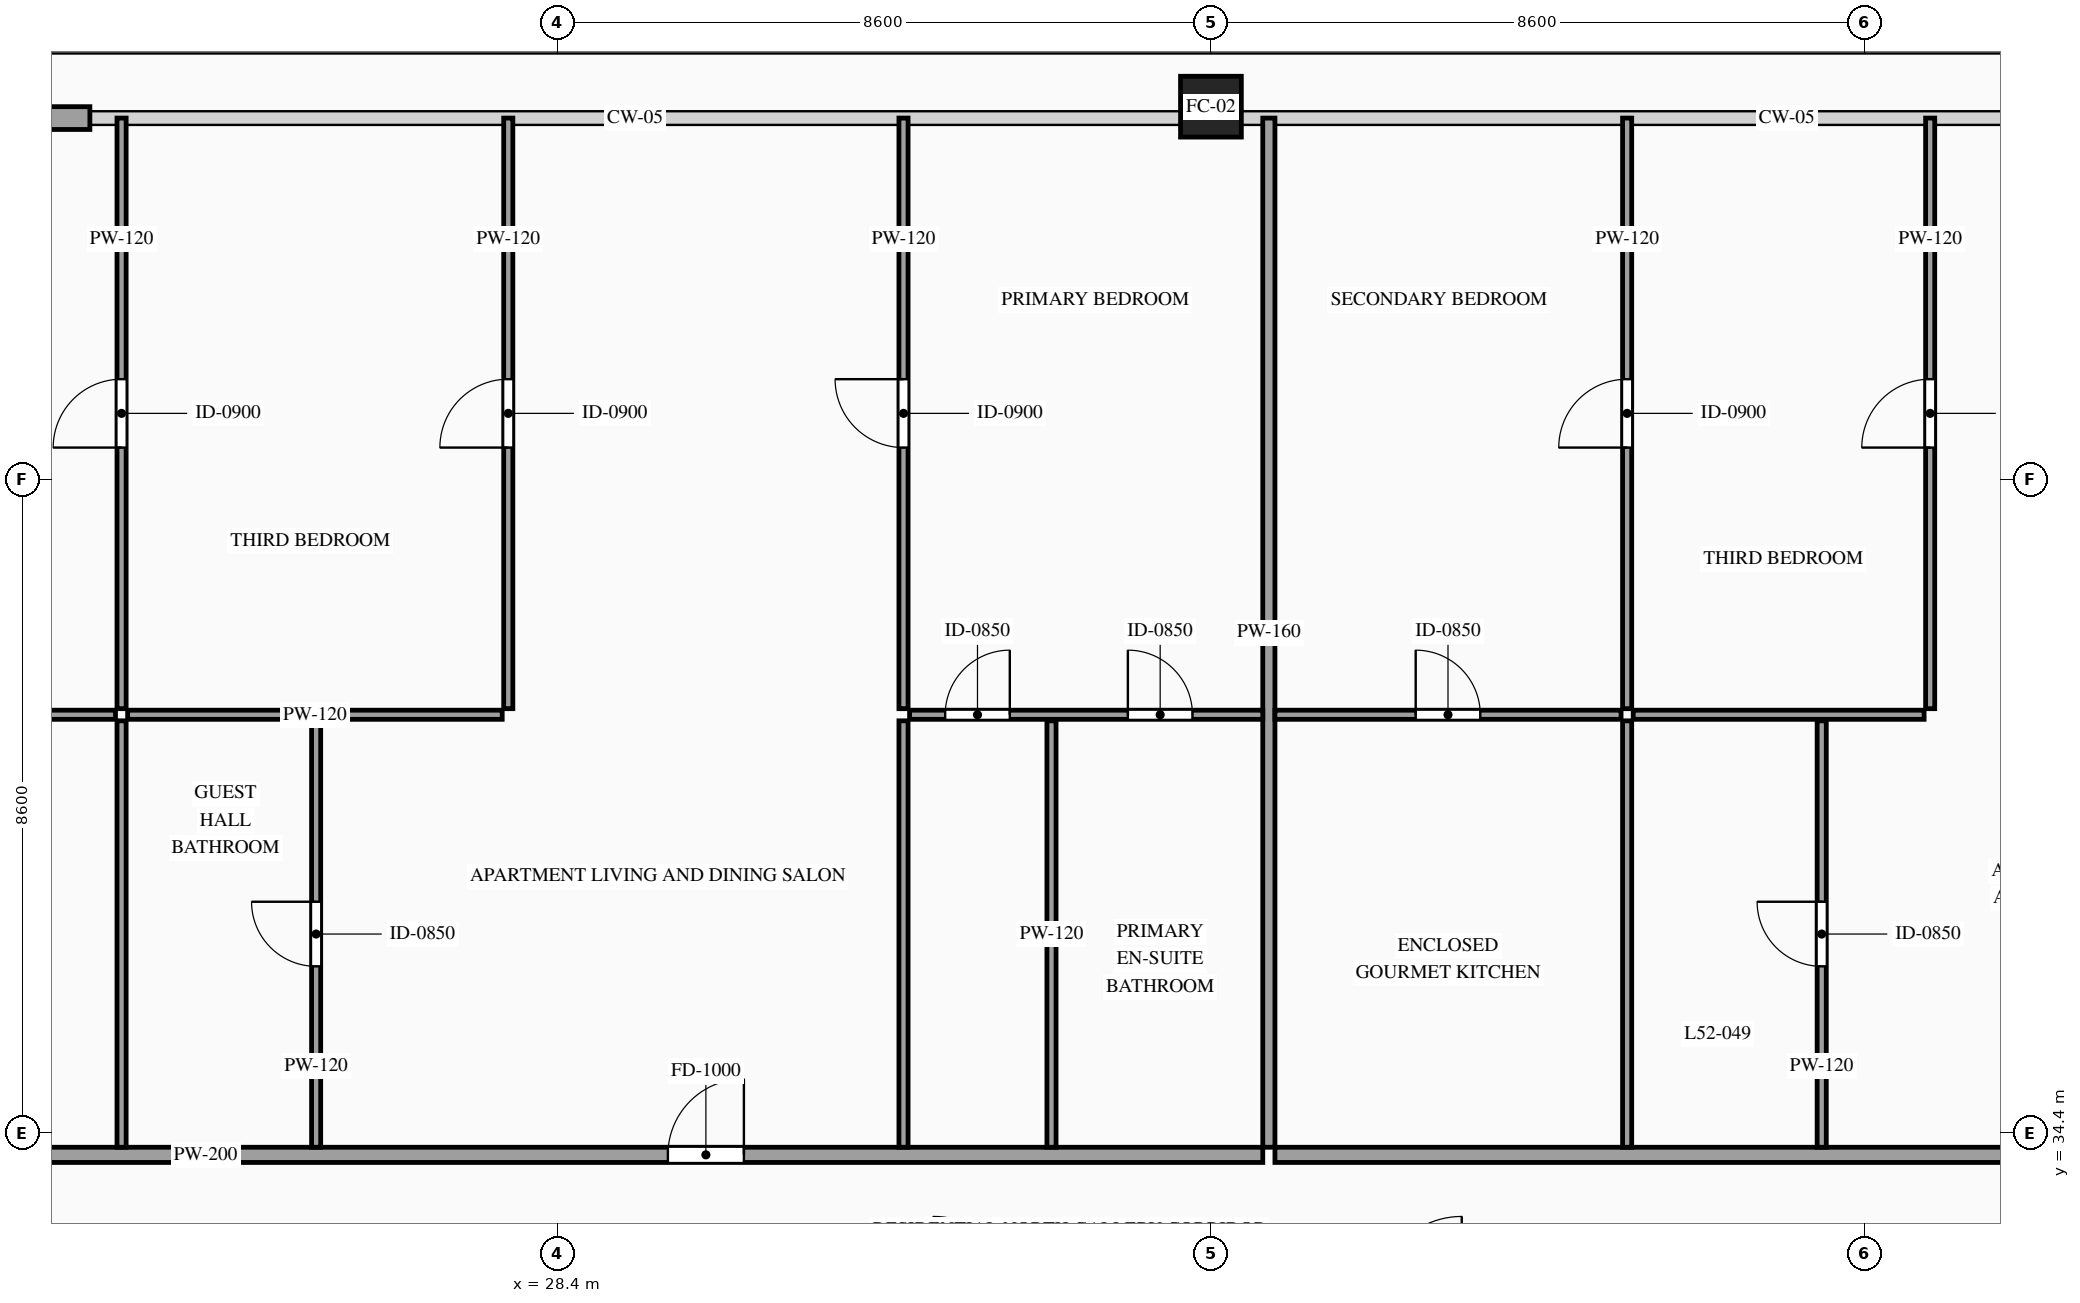
"""IFC4 building model, lengths in metres.
Left out: names, types, materials, properties, quantities, classifications, styles, units other than length and angle.
Written with IfcOpenShell. Run it as: python <this file> out.ifc"""

import sys

from ifc_helpers import new_model, si_unit, direction, frame, frame_2d, origin, origin_2d, place, context, subcontext, project, spatial, rectangle, hollow_rectangle, extrude, source, transform, mapped, element, fill, save


model = new_model("IFC4")
c1 = context("Model", 3, precision=1e-05, world=origin(), true_north=direction((0.0, 1.0)))
c2 = subcontext(c1, "Body", "Model", "MODEL_VIEW")
j1 = project(units=[si_unit("LENGTHUNIT", "METRE"), si_unit("PLANEANGLEUNIT", "RADIAN")], contexts=[c1])
p1 = place(None, origin())
s1 = spatial("IfcSite", under=j1, at=p1, CompositionType="ELEMENT")
p2 = place(p1, origin())
s2 = spatial("IfcBuilding", under=s1, at=p2, CompositionType="ELEMENT")
p3 = place(p2, frame((0.0, 0.0, 198.5)))
s3 = spatial("IfcBuildingStorey", under=s2, at=p3, CompositionType="ELEMENT", Elevation=198.5)
m1 = source(origin(), c2, "Body", "SweptSolid", [
    extrude(hollow_rectangle(XDim=0.8, YDim=0.8, WallThickness=0.036, at=origin_2d()), origin(), (0.0, 0.0, 1.0), 3.5),
])
p4 = place(p3, frame((37.0, 47.9, 0.0), z_axis=(0.0, 0.0, 1.0), x_axis=(1.0, 0.0, 0.0)))
e1 = element("IfcColumn", 1, at=p4, inside=s3, PredefinedType="COLUMN", context=c2, shape_type="MappedRepresentation", body=[
    mapped(m1, transform((0.0, 0.0, 0.0), scale=1.0)),
])
m2 = source(origin(), c2, "Body", "SweptSolid", [
    extrude(rectangle(XDim=3.05, YDim=0.3, at=frame_2d((1.525, 0.0))), origin(), (0.0, 0.0, 1.0), 2.835),
])
p5 = place(p3, frame((19.2, 47.75, 0.0), z_axis=(0.0, 0.0, 1.0), x_axis=(1.0, 0.0, 0.0)))
e2 = element("IfcWall", 2, at=p5, inside=s3, PredefinedType="SOLIDWALL", context=c2, shape_type="MappedRepresentation", body=[
    mapped(m2, transform((0.0, 0.0, 0.0), scale=1.0)),
])
p6 = place(p3, frame((17.94, 34.11, 0.0), z_axis=(0.0, 0.0, 1.0), x_axis=(1.0, 0.0, 0.0)))
e3 = element("IfcWall", 3, at=p6, inside=s3, PredefinedType="PARTITIONING", context=c2, shape_type="SweptSolid", body=[
    extrude(rectangle(XDim=19.742, YDim=0.2, at=frame_2d((9.871, 0.0))), origin(), (0.0, 0.0, 1.0), 3.28),
])
p7 = place(p6, frame((11.915, 0.0, 0.0)))
e4 = element("IfcOpeningElement", 4, at=p7, cuts=e3, PredefinedType="OPENING", context=c2, shape_type="SweptSolid", body=[
    extrude(rectangle(XDim=1.0, YDim=2.2, at=frame_2d((0.5, 1.1))), frame((0.0, 0.115, 0.0), z_axis=(0.0, -1.0, 0.0), x_axis=(1.0, 0.0, 0.0)), (0.0, 0.0, 1.0), 0.23),
])
m3 = source(origin(), c2, "Body", "SweptSolid", [
    extrude(rectangle(XDim=13.54, YDim=0.16, at=frame_2d((6.77, 0.0))), origin(), (0.0, 0.0, 1.0), 3.28),
])
p8 = place(p3, frame((37.762, 34.21, 0.0), z_axis=(0.0, 0.0, 1.0), x_axis=(0.0, 1.0, 0.0)))
e5 = element("IfcWall", 5, at=p8, inside=s3, PredefinedType="PARTITIONING", context=c2, shape_type="MappedRepresentation", body=[
    mapped(m3, transform((0.0, 0.0, 0.0), scale=1.0)),
])
p9 = place(p3, frame((17.94, 39.9, 0.0), z_axis=(0.0, 0.0, 1.0), x_axis=(1.0, 0.0, 0.0)))
e6 = element("IfcWall", 6, at=p9, inside=s3, PredefinedType="PARTITIONING", context=c2, shape_type="SweptSolid", body=[
    extrude(rectangle(XDim=4.647, YDim=0.12, at=frame_2d((2.323, 0.0))), origin(), (0.0, 0.0, 1.0), 3.28),
])
p10 = place(p9, frame((1.898, 0.0, 0.0)))
e7 = element("IfcOpeningElement", 7, at=p10, cuts=e6, PredefinedType="OPENING", context=c2, shape_type="SweptSolid", body=[
    extrude(rectangle(XDim=0.85, YDim=2.1, at=frame_2d((0.425, 1.05))), frame((0.0, 0.075, 0.0), z_axis=(0.0, -1.0, 0.0), x_axis=(1.0, 0.0, 0.0)), (0.0, 0.0, 1.0), 0.15),
])
m4 = source(origin(), c2, "Body", "SweptSolid", [
    extrude(rectangle(XDim=5.61, YDim=0.12, at=frame_2d((2.805, 0.0))), origin(), (0.0, 0.0, 1.0), 3.28),
])
p11 = place(p3, frame((22.667, 34.21, 0.0), z_axis=(0.0, 0.0, 1.0), x_axis=(0.0, 1.0, 0.0)))
e8 = element("IfcWall", 8, at=p11, inside=s3, PredefinedType="PARTITIONING", context=c2, shape_type="MappedRepresentation", body=[
    mapped(m4, transform((0.0, 0.0, 0.0), scale=1.0)),
])
p12 = place(p3, frame((25.227, 34.21, 0.0), z_axis=(0.0, 0.0, 1.0), x_axis=(0.0, 1.0, 0.0)))
e9 = element("IfcWall", 9, at=p12, inside=s3, PredefinedType="PARTITIONING", context=c2, shape_type="SweptSolid", body=[
    extrude(rectangle(XDim=5.61, YDim=0.12, at=frame_2d((2.805, 0.0))), origin(), (0.0, 0.0, 1.0), 3.28),
])
p13 = place(p12, frame((2.38, 0.0, 0.0)))
e10 = element("IfcOpeningElement", 10, at=p13, cuts=e9, PredefinedType="OPENING", context=c2, shape_type="SweptSolid", body=[
    extrude(rectangle(XDim=0.85, YDim=2.1, at=frame_2d((0.425, 1.05))), frame((0.0, 0.075, 0.0), z_axis=(0.0, -1.0, 0.0), x_axis=(1.0, 0.0, 0.0)), (0.0, 0.0, 1.0), 0.15),
])
for number, where, z_axis, x_axis in (
    (11, (34.902, 34.21, 0.0), (0.0, 0.0, 1.0), (0.0, 1.0, 0.0)),
    (12, (32.955, 34.21, 0.0), (0.0, 0.0, 1.0), (0.0, 1.0, 0.0)),
):
    element("IfcWall", number, at=place(p3, frame(where, z_axis=z_axis, x_axis=x_axis)), inside=s3, PredefinedType="PARTITIONING", context=c2, shape_type="MappedRepresentation", body=[
        mapped(m4, transform((0.0, 0.0, 0.0), scale=1.0)),
    ])
p14 = place(p3, frame((22.667, 39.98, 0.0), z_axis=(0.0, 0.0, 1.0), x_axis=(0.0, 1.0, 0.0)))
e13 = element("IfcWall", 13, at=p14, inside=s3, PredefinedType="PARTITIONING", context=c2, shape_type="SweptSolid", body=[
    extrude(rectangle(XDim=7.77, YDim=0.12, at=frame_2d((3.885, 0.0))), origin(), (0.0, 0.0, 1.0), 3.28),
])
p15 = place(p14, frame((3.435, 0.0, 0.0)))
e14 = element("IfcOpeningElement", 14, at=p15, cuts=e13, PredefinedType="OPENING", context=c2, shape_type="SweptSolid", body=[
    extrude(rectangle(XDim=0.9, YDim=2.15, at=frame_2d((0.45, 1.075))), frame((0.0, 0.075, 0.0), z_axis=(0.0, -1.0, 0.0), x_axis=(1.0, 0.0, 0.0)), (0.0, 0.0, 1.0), 0.15),
])
p16 = place(p3, frame((33.035, 39.9, 0.0), z_axis=(0.0, 0.0, 1.0), x_axis=(1.0, 0.0, 0.0)))
e15 = element("IfcWall", 15, at=p16, inside=s3, PredefinedType="PARTITIONING", context=c2, shape_type="SweptSolid", body=[
    extrude(rectangle(XDim=4.647, YDim=0.12, at=frame_2d((2.323, 0.0))), origin(), (0.0, 0.0, 1.0), 2.875),
])
p17 = place(p16, frame((2.872, 0.0, 0.0)))
e16 = element("IfcOpeningElement", 16, at=p17, cuts=e15, PredefinedType="OPENING", context=c2, shape_type="SweptSolid", body=[
    extrude(rectangle(XDim=0.85, YDim=2.1, at=frame_2d((0.425, 1.05))), frame((0.0, 0.075, 0.0), z_axis=(0.0, -1.0, 0.0), x_axis=(1.0, 0.0, 0.0)), (0.0, 0.0, 1.0), 0.15),
])
p18 = place(p16, frame((0.469, 0.0, 0.0)))
e17 = element("IfcOpeningElement", 17, at=p18, cuts=e15, PredefinedType="OPENING", context=c2, shape_type="SweptSolid", body=[
    extrude(rectangle(XDim=0.85, YDim=2.1, at=frame_2d((0.425, 1.05))), frame((0.0, 0.075, 0.0), z_axis=(0.0, -1.0, 0.0), x_axis=(1.0, 0.0, 0.0)), (0.0, 0.0, 1.0), 0.15),
])
p19 = place(p3, frame((32.955, 39.98, 0.0), z_axis=(0.0, 0.0, 1.0), x_axis=(0.0, 1.0, 0.0)))
e18 = element("IfcWall", 18, at=p19, inside=s3, PredefinedType="PARTITIONING", context=c2, shape_type="SweptSolid", body=[
    extrude(rectangle(XDim=7.77, YDim=0.12, at=frame_2d((3.885, 0.0))), origin(), (0.0, 0.0, 1.0), 3.28),
])
p20 = place(p19, frame((3.435, 0.0, 0.0)))
e19 = element("IfcOpeningElement", 19, at=p20, cuts=e18, PredefinedType="OPENING", context=c2, shape_type="SweptSolid", body=[
    extrude(rectangle(XDim=0.9, YDim=2.15, at=frame_2d((0.45, 1.075))), frame((0.0, 0.075, 0.0), z_axis=(0.0, -1.0, 0.0), x_axis=(1.0, 0.0, 0.0)), (0.0, 0.0, 1.0), 0.15),
])
m5 = source(origin(), c2, "Body", "SweptSolid", [
    extrude(rectangle(XDim=4.928, YDim=0.12, at=frame_2d((2.464, 0.0))), origin(), (0.0, 0.0, 1.0), 2.875),
])
p21 = place(p3, frame((22.747, 39.9, 0.0), z_axis=(0.0, 0.0, 1.0), x_axis=(1.0, 0.0, 0.0)))
e20 = element("IfcWall", 20, at=p21, inside=s3, PredefinedType="PARTITIONING", context=c2, shape_type="MappedRepresentation", body=[
    mapped(m5, transform((0.0, 0.0, 0.0), scale=1.0)),
])
p22 = place(p3, frame((27.755, 39.98, 0.0), z_axis=(0.0, 0.0, 1.0), x_axis=(0.0, 1.0, 0.0)))
e21 = element("IfcWall", 21, at=p22, inside=s3, PredefinedType="PARTITIONING", context=c2, shape_type="SweptSolid", body=[
    extrude(rectangle(XDim=7.77, YDim=0.12, at=frame_2d((3.885, 0.0))), origin(), (0.0, 0.0, 1.0), 3.28),
])
p23 = place(p22, frame((3.435, 0.0, 0.0)))
e22 = element("IfcOpeningElement", 22, at=p23, cuts=e21, PredefinedType="OPENING", context=c2, shape_type="SweptSolid", body=[
    extrude(rectangle(XDim=0.9, YDim=2.15, at=frame_2d((0.45, 1.075))), frame((0.0, 0.075, 0.0), z_axis=(0.0, -1.0, 0.0), x_axis=(1.0, 0.0, 0.0)), (0.0, 0.0, 1.0), 0.15),
])
p24 = place(p3, frame((37.842, 34.11, 0.0), z_axis=(0.0, 0.0, 1.0), x_axis=(1.0, 0.0, 0.0)))
e23 = element("IfcWall", 23, at=p24, inside=s3, PredefinedType="PARTITIONING", context=c2, shape_type="SweptSolid", body=[
    extrude(rectangle(XDim=18.218, YDim=0.2, at=frame_2d((9.109, 0.0))), origin(), (0.0, 0.0, 1.0), 3.28),
])
p25 = place(p24, frame((10.556, 0.0, 0.0)))
e24 = element("IfcOpeningElement", 24, at=p25, cuts=e23, PredefinedType="OPENING", context=c2, shape_type="SweptSolid", body=[
    extrude(rectangle(XDim=1.0, YDim=2.2, at=frame_2d((0.5, 1.1))), frame((0.0, 0.115, 0.0), z_axis=(0.0, -1.0, 0.0), x_axis=(1.0, 0.0, 0.0)), (0.0, 0.0, 1.0), 0.23),
])
p26 = place(p3, frame((37.842, 39.9, 0.0), z_axis=(0.0, 0.0, 1.0), x_axis=(1.0, 0.0, 0.0)))
e25 = element("IfcWall", 25, at=p26, inside=s3, PredefinedType="PARTITIONING", context=c2, shape_type="SweptSolid", body=[
    extrude(rectangle(XDim=4.554, YDim=0.12, at=frame_2d((2.277, 0.0))), origin(), (0.0, 0.0, 1.0), 2.875),
])
p27 = place(p26, frame((1.852, 0.0, 0.0)))
e26 = element("IfcOpeningElement", 26, at=p27, cuts=e25, PredefinedType="OPENING", context=c2, shape_type="SweptSolid", body=[
    extrude(rectangle(XDim=0.85, YDim=2.1, at=frame_2d((0.425, 1.05))), frame((0.0, 0.075, 0.0), z_axis=(0.0, -1.0, 0.0), x_axis=(1.0, 0.0, 0.0)), (0.0, 0.0, 1.0), 0.15),
])
p28 = place(p3, frame((42.476, 34.21, 0.0), z_axis=(0.0, 0.0, 1.0), x_axis=(0.0, 1.0, 0.0)))
e27 = element("IfcWall", 27, at=p28, inside=s3, PredefinedType="PARTITIONING", context=c2, shape_type="MappedRepresentation", body=[
    mapped(m4, transform((0.0, 0.0, 0.0), scale=1.0)),
])
p29 = place(p3, frame((45.036, 34.21, 0.0), z_axis=(0.0, 0.0, 1.0), x_axis=(0.0, 1.0, 0.0)))
e28 = element("IfcWall", 28, at=p29, inside=s3, PredefinedType="PARTITIONING", context=c2, shape_type="SweptSolid", body=[
    extrude(rectangle(XDim=5.61, YDim=0.12, at=frame_2d((2.805, 0.0))), origin(), (0.0, 0.0, 1.0), 3.28),
])
p30 = place(p29, frame((2.38, 0.0, 0.0)))
e29 = element("IfcOpeningElement", 29, at=p30, cuts=e28, PredefinedType="OPENING", context=c2, shape_type="SweptSolid", body=[
    extrude(rectangle(XDim=0.85, YDim=2.1, at=frame_2d((0.425, 1.05))), frame((0.0, 0.075, 0.0), z_axis=(0.0, -1.0, 0.0), x_axis=(1.0, 0.0, 0.0)), (0.0, 0.0, 1.0), 0.15),
])
p31 = place(p3, frame((42.476, 39.98, 0.0), z_axis=(0.0, 0.0, 1.0), x_axis=(0.0, 1.0, 0.0)))
e30 = element("IfcWall", 30, at=p31, inside=s3, PredefinedType="PARTITIONING", context=c2, shape_type="SweptSolid", body=[
    extrude(rectangle(XDim=7.77, YDim=0.12, at=frame_2d((3.885, 0.0))), origin(), (0.0, 0.0, 1.0), 3.28),
])
p32 = place(p31, frame((3.435, 0.0, 0.0)))
e31 = element("IfcOpeningElement", 31, at=p32, cuts=e30, PredefinedType="OPENING", context=c2, shape_type="SweptSolid", body=[
    extrude(rectangle(XDim=0.9, YDim=2.15, at=frame_2d((0.45, 1.075))), frame((0.0, 0.075, 0.0), z_axis=(0.0, -1.0, 0.0), x_axis=(1.0, 0.0, 0.0)), (0.0, 0.0, 1.0), 0.15),
])
m6 = source(origin(), c2, "Body", "SweptSolid", [
    extrude(rectangle(XDim=3.827, YDim=0.12, at=frame_2d((1.914, 0.0))), origin(), (0.0, 0.0, 1.0), 2.875),
])
p33 = place(p3, frame((42.556, 39.9, 0.0), z_axis=(0.0, 0.0, 1.0), x_axis=(1.0, 0.0, 0.0)))
e32 = element("IfcWall", 32, at=p33, inside=s3, PredefinedType="PARTITIONING", context=c2, shape_type="MappedRepresentation", body=[
    mapped(m6, transform((0.0, 0.0, 0.0), scale=1.0)),
])
p34 = place(p3, frame((46.463, 39.98, 0.0), z_axis=(0.0, 0.0, 1.0), x_axis=(0.0, 1.0, 0.0)))
e33 = element("IfcWall", 33, at=p34, inside=s3, PredefinedType="PARTITIONING", context=c2, shape_type="SweptSolid", body=[
    extrude(rectangle(XDim=7.77, YDim=0.12, at=frame_2d((3.885, 0.0))), origin(), (0.0, 0.0, 1.0), 3.28),
])
p35 = place(p34, frame((3.435, 0.0, 0.0)))
e34 = element("IfcOpeningElement", 34, at=p35, cuts=e33, PredefinedType="OPENING", context=c2, shape_type="SweptSolid", body=[
    extrude(rectangle(XDim=0.9, YDim=2.15, at=frame_2d((0.45, 1.075))), frame((0.0, 0.075, 0.0), z_axis=(0.0, -1.0, 0.0), x_axis=(1.0, 0.0, 0.0)), (0.0, 0.0, 1.0), 0.15),
])
m7 = source(origin(), c2, "Body", "SweptSolid", [
    extrude(rectangle(XDim=1.0, YDim=2.2, at=frame_2d((0.5, 1.1))), frame((0.0, 0.025, 0.0), z_axis=(0.0, -1.0, 0.0), x_axis=(1.0, 0.0, 0.0)), (0.0, 0.0, 1.0), 0.05),
])
p36 = place(p7, origin())
e35 = element("IfcDoor", 35, at=p36, inside=s3, OperationType="SINGLE_SWING_RIGHT", PredefinedType="DOOR", context=c2, shape_type="MappedRepresentation", body=[
    mapped(m7, transform((0.0, 0.0, 0.0), scale=1.0)),
])
fill(e4, e35)
m8 = source(origin(), c2, "Body", "SweptSolid", [
    extrude(rectangle(XDim=0.85, YDim=2.1, at=frame_2d((0.425, 1.05))), frame((0.0, 0.025, 0.0), z_axis=(0.0, -1.0, 0.0), x_axis=(1.0, 0.0, 0.0)), (0.0, 0.0, 1.0), 0.05),
])
p37 = place(p13, origin())
e36 = element("IfcDoor", 36, at=p37, inside=s3, OperationType="SINGLE_SWING_RIGHT", PredefinedType="DOOR", context=c2, shape_type="MappedRepresentation", body=[
    mapped(m8, transform((0.0, 0.0, 0.0), scale=1.0)),
])
fill(e10, e36)
p38 = place(p17, origin())
e37 = element("IfcDoor", 37, at=p38, inside=s3, OperationType="SINGLE_SWING_LEFT", PredefinedType="DOOR", context=c2, shape_type="MappedRepresentation", body=[
    mapped(m8, transform((0.0, 0.0, 0.0), scale=1.0)),
])
fill(e16, e37)
p39 = place(p18, origin())
e38 = element("IfcDoor", 38, at=p39, inside=s3, OperationType="SINGLE_SWING_RIGHT", PredefinedType="DOOR", context=c2, shape_type="MappedRepresentation", body=[
    mapped(m8, transform((0.0, 0.0, 0.0), scale=1.0)),
])
fill(e17, e38)
m9 = source(origin(), c2, "Body", "SweptSolid", [
    extrude(rectangle(XDim=0.9, YDim=2.15, at=frame_2d((0.45, 1.075))), frame((0.0, 0.025, 0.0), z_axis=(0.0, -1.0, 0.0), x_axis=(1.0, 0.0, 0.0)), (0.0, 0.0, 1.0), 0.05),
])
p40 = place(p15, origin())
e39 = element("IfcDoor", 39, at=p40, inside=s3, OperationType="SINGLE_SWING_LEFT", PredefinedType="DOOR", context=c2, shape_type="MappedRepresentation", body=[
    mapped(m9, transform((0.0, 0.0, 0.0), scale=1.0)),
])
fill(e14, e39)
p41 = place(p20, origin())
e40 = element("IfcDoor", 40, at=p41, inside=s3, OperationType="SINGLE_SWING_RIGHT", PredefinedType="DOOR", context=c2, shape_type="MappedRepresentation", body=[
    mapped(m9, transform((0.0, 0.0, 0.0), scale=1.0)),
])
fill(e19, e40)
p42 = place(p23, origin())
e41 = element("IfcDoor", 41, at=p42, inside=s3, OperationType="SINGLE_SWING_LEFT", PredefinedType="DOOR", context=c2, shape_type="MappedRepresentation", body=[
    mapped(m9, transform((0.0, 0.0, 0.0), scale=1.0)),
])
fill(e22, e41)
p43 = place(p27, origin())
e42 = element("IfcDoor", 42, at=p43, inside=s3, OperationType="SINGLE_SWING_LEFT", PredefinedType="DOOR", context=c2, shape_type="MappedRepresentation", body=[
    mapped(m8, transform((0.0, 0.0, 0.0), scale=1.0)),
])
fill(e26, e42)
p44 = place(p30, origin())
e43 = element("IfcDoor", 43, at=p44, inside=s3, OperationType="SINGLE_SWING_RIGHT", PredefinedType="DOOR", context=c2, shape_type="MappedRepresentation", body=[
    mapped(m8, transform((0.0, 0.0, 0.0), scale=1.0)),
])
fill(e29, e43)
p45 = place(p32, origin())
e44 = element("IfcDoor", 44, at=p45, inside=s3, OperationType="SINGLE_SWING_LEFT", PredefinedType="DOOR", context=c2, shape_type="MappedRepresentation", body=[
    mapped(m9, transform((0.0, 0.0, 0.0), scale=1.0)),
])
fill(e31, e44)
p46 = place(p35, origin())
e45 = element("IfcDoor", 45, at=p46, inside=s3, OperationType="SINGLE_SWING_LEFT", PredefinedType="DOOR", context=c2, shape_type="MappedRepresentation", body=[
    mapped(m9, transform((0.0, 0.0, 0.0), scale=1.0)),
])
fill(e34, e45)
save(model, sys.argv[1])
